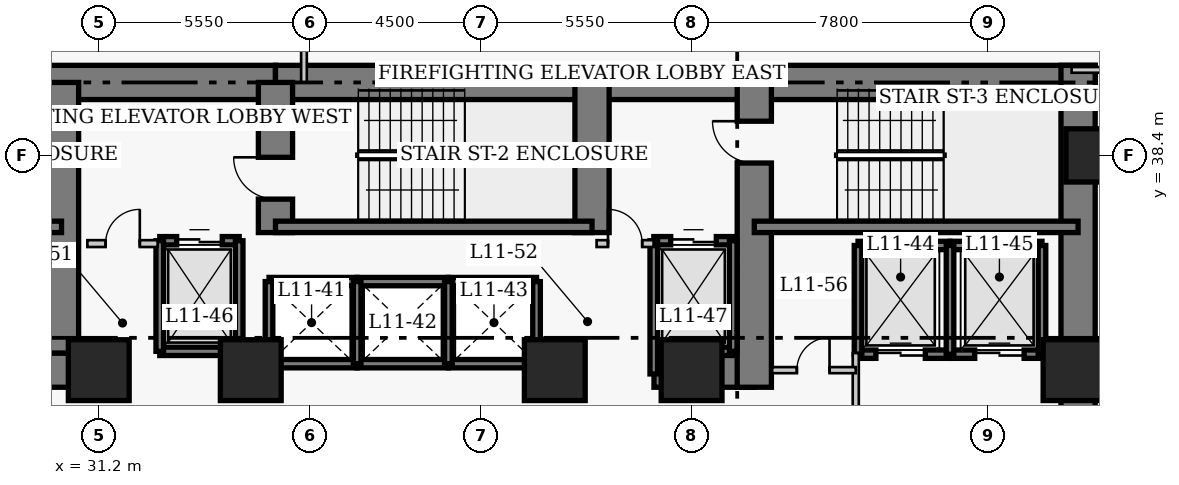
"""IFC4 building model, lengths in metres.
Left out: names, types, materials, properties, quantities, classifications, styles, units other than length and angle.
Written with IfcOpenShell. Run it as: python <this file> out.ifc"""

import sys

from ifc_helpers import new_model, si_unit, direction, frame, frame_2d, origin, origin_2d, place, context, subcontext, project, spatial, rectangle, extrude, element, fill, save


model = new_model("IFC4")
c1 = context("Model", 3, precision=1e-05, world=origin(), true_north=direction((0.0, 1.0)))
c2 = subcontext(c1, "Body", "Model", "MODEL_VIEW")
j1 = project(units=[si_unit("LENGTHUNIT", "METRE"), si_unit("PLANEANGLEUNIT", "RADIAN")], contexts=[c1])
p1 = place(None, origin())
s1 = spatial("IfcSite", under=j1, at=p1, CompositionType="ELEMENT")
p2 = place(p1, origin())
s2 = spatial("IfcBuilding", under=s1, at=p2, CompositionType="ELEMENT")
p3 = place(p2, frame((0.0, 0.0, 48.8)))
s3 = spatial("IfcBuildingStorey", under=s2, at=p3, CompositionType="ELEMENT", Elevation=48.8)
p4 = place(p3, frame((21.45, 40.32, 0.0), z_axis=(0.0, 0.0, 1.0), x_axis=(1.0, 0.0, 0.0)))
e1 = element("IfcWall", 1, at=p4, inside=s3, PredefinedType="SHEAR", context=c2, shape_type="SweptSolid", body=[
    extrude(rectangle(XDim=14.4, YDim=0.9, at=frame_2d((7.2, 0.0))), origin(), (0.0, 0.0, 1.0), 3.8),
])
p5 = place(p3, frame((35.85, 40.32, 0.0), z_axis=(0.0, 0.0, 1.0), x_axis=(1.0, 0.0, 0.0)))
e2 = element("IfcWall", 2, at=p5, inside=s3, PredefinedType="SHEAR", context=c2, shape_type="SweptSolid", body=[
    extrude(rectangle(XDim=12.6, YDim=0.9, at=frame_2d((6.3, 0.0))), origin(), (0.0, 0.0, 1.0), 3.8),
])
p6 = place(p3, frame((48.45, 40.32, 0.0), z_axis=(0.0, 0.0, 1.0), x_axis=(1.0, 0.0, 0.0)))
e3 = element("IfcWall", 3, at=p6, inside=s3, PredefinedType="SHEAR", context=c2, shape_type="SweptSolid", body=[
    extrude(rectangle(XDim=8.97, YDim=0.9, at=frame_2d((4.485, 0.0))), origin(), (0.0, 0.0, 1.0), 3.8),
])
p7 = place(p3, frame((56.97, 27.05, 0.0), z_axis=(0.0, 0.0, 1.0), x_axis=(0.0, 1.0, 0.0)))
e4 = element("IfcWall", 4, at=p7, inside=s3, PredefinedType="SHEAR", context=c2, shape_type="SweptSolid", body=[
    extrude(rectangle(XDim=13.72, YDim=0.9, at=frame_2d((6.86, 0.0))), origin(), (0.0, 0.0, 1.0), 3.8),
])
p8 = place(p3, frame((28.45, 32.75, 0.0), z_axis=(0.0, 0.0, 1.0), x_axis=(1.0, 0.0, 0.0)))
e5 = element("IfcWall", 5, at=p8, inside=s3, PredefinedType="SHEAR", context=c2, shape_type="SweptSolid", body=[
    extrude(rectangle(XDim=2.4, YDim=0.9, at=frame_2d((1.2, 0.0))), origin(), (0.0, 0.0, 1.0), 3.8),
])
p9 = place(p3, frame((45.81, 32.75, 0.0), z_axis=(0.0, 0.0, 1.0), x_axis=(1.0, 0.0, 0.0)))
e6 = element("IfcWall", 6, at=p9, inside=s3, PredefinedType="SHEAR", context=c2, shape_type="SweptSolid", body=[
    extrude(rectangle(XDim=2.64, YDim=0.9, at=frame_2d((1.32, 0.0))), origin(), (0.0, 0.0, 1.0), 3.8),
])
p10 = place(p3, frame((30.22, 33.2, 0.0), z_axis=(0.0, 0.0, 1.0), x_axis=(0.0, 1.0, 0.0)))
e7 = element("IfcWall", 7, at=p10, inside=s3, PredefinedType="SHEAR", context=c2, shape_type="SweptSolid", body=[
    extrude(rectangle(XDim=7.12, YDim=0.9, at=frame_2d((3.56, 0.0))), origin(), (0.0, 0.0, 1.0), 3.8),
])
p11 = place(p3, frame((35.85, 36.37, 0.0), z_axis=(0.0, 0.0, 1.0), x_axis=(0.0, 1.0, 0.0)))
e8 = element("IfcWall", 8, at=p11, inside=s3, PredefinedType="SHEAR", context=c2, shape_type="SweptSolid", body=[
    extrude(rectangle(XDim=3.95, YDim=0.9, at=frame_2d((1.975, 0.0))), origin(), (0.0, 0.0, 1.0), 3.8),
])
p12 = place(p11, frame((0.88, 0.0, 0.0)))
e9 = element("IfcOpeningElement", 9, at=p12, cuts=e8, PredefinedType="OPENING", context=c2, shape_type="SweptSolid", body=[
    extrude(rectangle(XDim=1.1, YDim=2.15, at=frame_2d((0.55, 1.075))), frame((0.0, 0.46, 0.0), z_axis=(0.0, -1.0, 0.0), x_axis=(1.0, 0.0, 0.0)), (0.0, 0.0, 1.0), 0.92),
])
p13 = place(p3, frame((44.18, 36.37, 0.0), z_axis=(0.0, 0.0, 1.0), x_axis=(0.0, 1.0, 0.0)))
e10 = element("IfcWall", 10, at=p13, inside=s3, PredefinedType="SHEAR", context=c2, shape_type="SweptSolid", body=[
    extrude(rectangle(XDim=3.95, YDim=0.9, at=frame_2d((1.975, 0.0))), origin(), (0.0, 0.0, 1.0), 3.8),
])
p14 = place(p3, frame((48.45, 32.3, 0.0), z_axis=(0.0, 0.0, 1.0), x_axis=(0.0, 1.0, 0.0)))
e11 = element("IfcWall", 11, at=p14, inside=s3, PredefinedType="SHEAR", context=c2, shape_type="SweptSolid", body=[
    extrude(rectangle(XDim=8.02, YDim=0.9, at=frame_2d((4.01, 0.0))), origin(), (0.0, 0.0, 1.0), 3.8),
])
p15 = place(p14, frame((5.9, 0.0, 0.0)))
e12 = element("IfcOpeningElement", 12, at=p15, cuts=e11, PredefinedType="OPENING", context=c2, shape_type="SweptSolid", body=[
    extrude(rectangle(XDim=1.1, YDim=2.15, at=frame_2d((0.55, 1.075))), frame((0.0, 0.46, 0.0), z_axis=(0.0, -1.0, 0.0), x_axis=(1.0, 0.0, 0.0)), (0.0, 0.0, 1.0), 0.92),
])
p16 = place(p3, frame((21.9, 36.52, 0.0), z_axis=(0.0, 0.0, 1.0), x_axis=(1.0, 0.0, 0.0)))
e13 = element("IfcWall", 13, at=p16, inside=s3, PredefinedType="SHEAR", context=c2, shape_type="SweptSolid", body=[
    extrude(rectangle(XDim=8.32, YDim=0.3, at=frame_2d((4.16, 0.0))), origin(), (0.0, 0.0, 1.0), 3.8),
])
p17 = place(p16, frame((0.9, 0.0, 0.0)))
e14 = element("IfcOpeningElement", 14, at=p17, cuts=e13, PredefinedType="OPENING", context=c2, shape_type="SweptSolid", body=[
    extrude(rectangle(XDim=1.1, YDim=2.15, at=frame_2d((0.55, 1.075))), frame((0.0, 0.16, 0.0), z_axis=(0.0, -1.0, 0.0), x_axis=(1.0, 0.0, 0.0)), (0.0, 0.0, 1.0), 0.32),
])
p18 = place(p3, frame((35.85, 36.52, 0.0), z_axis=(0.0, 0.0, 1.0), x_axis=(1.0, 0.0, 0.0)))
e15 = element("IfcWall", 15, at=p18, inside=s3, PredefinedType="SHEAR", context=c2, shape_type="SweptSolid", body=[
    extrude(rectangle(XDim=8.33, YDim=0.3, at=frame_2d((4.165, 0.0))), origin(), (0.0, 0.0, 1.0), 3.8),
])
p19 = place(p3, frame((48.45, 36.52, 0.0), z_axis=(0.0, 0.0, 1.0), x_axis=(1.0, 0.0, 0.0)))
e16 = element("IfcWall", 16, at=p19, inside=s3, PredefinedType="SHEAR", context=c2, shape_type="SweptSolid", body=[
    extrude(rectangle(XDim=8.52, YDim=0.3, at=frame_2d((4.26, 0.0))), origin(), (0.0, 0.0, 1.0), 3.8),
])
p20 = place(p3, frame((57.35, 38.4, 0.0), z_axis=(0.0, 0.0, 1.0), x_axis=(1.0, 0.0, 0.0)))
e17 = element("IfcColumn", 17, at=p20, inside=s3, PredefinedType="COLUMN", context=c2, shape_type="SweptSolid", body=[
    extrude(rectangle(XDim=1.4, YDim=1.4, at=origin_2d()), origin(), (0.0, 0.0, 1.0), 3.8),
])
for number, where, z_axis, x_axis in (
    (18, (31.2, 32.75, 0.0), (0.0, 0.0, 1.0), (1.0, 0.0, 0.0)),
    (19, (35.2, 32.75, 0.0), (0.0, 0.0, 1.0), (1.0, 0.0, 0.0)),
    (20, (43.2, 32.75, 0.0), (0.0, 0.0, 1.0), (1.0, 0.0, 0.0)),
    (21, (46.8, 32.75, 0.0), (0.0, 0.0, 1.0), (1.0, 0.0, 0.0)),
    (22, (56.85, 32.75, 0.0), (0.0, 0.0, 1.0), (1.0, 0.0, 0.0)),
):
    element("IfcColumn", number, at=place(p3, frame(where, z_axis=z_axis, x_axis=x_axis)), inside=s3, PredefinedType="COLUMN", context=c2, shape_type="SweptSolid", body=[
        extrude(rectangle(XDim=1.6, YDim=1.6, at=origin_2d()), origin(), (0.0, 0.0, 1.0), 3.8),
    ])
for number, where, z_axis, x_axis in (
    (23, (35.68, 35.08, 0.0), (0.0, 0.0, 1.0), (1.0, 0.0, 0.0)),
    (24, (35.68, 32.92, 0.0), (0.0, 0.0, 1.0), (1.0, 0.0, 0.0)),
):
    element("IfcWall", number, at=place(p3, frame(where, z_axis=z_axis, x_axis=x_axis)), inside=s3, PredefinedType="SHEAR", context=c2, shape_type="SweptSolid", body=[
        extrude(rectangle(XDim=2.32, YDim=0.22, at=frame_2d((1.16, 0.0))), origin(), (0.0, 0.0, 1.0), 3.8),
    ])
p21 = place(p3, frame((35.68, 32.92, 0.0), z_axis=(0.0, 0.0, 1.0), x_axis=(0.0, 1.0, 0.0)))
e25 = element("IfcWall", 25, at=p21, inside=s3, PredefinedType="SHEAR", context=c2, shape_type="SweptSolid", body=[
    extrude(rectangle(XDim=2.16, YDim=0.2, at=frame_2d((1.08, 0.0))), origin(), (0.0, 0.0, 1.0), 3.8),
])
for number, where, z_axis, x_axis in (
    (26, (38.0, 35.08, 0.0), (0.0, 0.0, 1.0), (1.0, 0.0, 0.0)),
    (27, (38.0, 32.92, 0.0), (0.0, 0.0, 1.0), (1.0, 0.0, 0.0)),
):
    element("IfcWall", number, at=place(p3, frame(where, z_axis=z_axis, x_axis=x_axis)), inside=s3, PredefinedType="SHEAR", context=c2, shape_type="SweptSolid", body=[
        extrude(rectangle(XDim=2.4, YDim=0.22, at=frame_2d((1.2, 0.0))), origin(), (0.0, 0.0, 1.0), 3.8),
    ])
p22 = place(p3, frame((38.0, 32.92, 0.0), z_axis=(0.0, 0.0, 1.0), x_axis=(0.0, 1.0, 0.0)))
e28 = element("IfcWall", 28, at=p22, inside=s3, PredefinedType="SHEAR", context=c2, shape_type="SweptSolid", body=[
    extrude(rectangle(XDim=2.16, YDim=0.2, at=frame_2d((1.08, 0.0))), origin(), (0.0, 0.0, 1.0), 3.8),
])
for number, where, z_axis, x_axis in (
    (29, (40.4, 35.08, 0.0), (0.0, 0.0, 1.0), (1.0, 0.0, 0.0)),
    (30, (40.4, 32.92, 0.0), (0.0, 0.0, 1.0), (1.0, 0.0, 0.0)),
):
    element("IfcWall", number, at=place(p3, frame(where, z_axis=z_axis, x_axis=x_axis)), inside=s3, PredefinedType="SHEAR", context=c2, shape_type="SweptSolid", body=[
        extrude(rectangle(XDim=2.32, YDim=0.22, at=frame_2d((1.16, 0.0))), origin(), (0.0, 0.0, 1.0), 3.8),
    ])
for number, where, z_axis, x_axis in (
    (31, (40.4, 32.92, 0.0), (0.0, 0.0, 1.0), (0.0, 1.0, 0.0)),
    (32, (42.72, 32.92, 0.0), (0.0, 0.0, 1.0), (0.0, 1.0, 0.0)),
):
    element("IfcWall", number, at=place(p3, frame(where, z_axis=z_axis, x_axis=x_axis)), inside=s3, PredefinedType="SHEAR", context=c2, shape_type="SweptSolid", body=[
        extrude(rectangle(XDim=2.16, YDim=0.2, at=frame_2d((1.08, 0.0))), origin(), (0.0, 0.0, 1.0), 3.8),
    ])
p23 = place(p3, frame((51.18, 36.03, 0.0), z_axis=(0.0, 0.0, 1.0), x_axis=(1.0, 0.0, 0.0)))
e33 = element("IfcWall", 33, at=p23, inside=s3, PredefinedType="SHEAR", context=c2, shape_type="SweptSolid", body=[
    extrude(rectangle(XDim=2.42, YDim=0.22, at=frame_2d((1.21, 0.0))), origin(), (0.0, 0.0, 1.0), 3.8),
])
p24 = place(p3, frame((51.18, 33.17, 0.0), z_axis=(0.0, 0.0, 1.0), x_axis=(1.0, 0.0, 0.0)))
e34 = element("IfcWall", 34, at=p24, inside=s3, PredefinedType="SHEAR", context=c2, shape_type="SweptSolid", body=[
    extrude(rectangle(XDim=2.42, YDim=0.22, at=frame_2d((1.21, 0.0))), origin(), (0.0, 0.0, 1.0), 3.8),
])
p25 = place(p24, frame((0.47, 0.0, 0.0)))
e35 = element("IfcOpeningElement", 35, at=p25, cuts=e34, PredefinedType="OPENING", context=c2, shape_type="SweptSolid", body=[
    extrude(rectangle(XDim=1.3, YDim=2.15, at=frame_2d((0.65, 1.075))), frame((0.0, 0.12, 0.0), z_axis=(0.0, -1.0, 0.0), x_axis=(1.0, 0.0, 0.0)), (0.0, 0.0, 1.0), 0.24),
])
p26 = place(p3, frame((51.18, 33.17, 0.0), z_axis=(0.0, 0.0, 1.0), x_axis=(0.0, 1.0, 0.0)))
e36 = element("IfcWall", 36, at=p26, inside=s3, PredefinedType="SHEAR", context=c2, shape_type="SweptSolid", body=[
    extrude(rectangle(XDim=2.86, YDim=0.2, at=frame_2d((1.43, 0.0))), origin(), (0.0, 0.0, 1.0), 3.8),
])
p27 = place(p3, frame((53.6, 36.03, 0.0), z_axis=(0.0, 0.0, 1.0), x_axis=(1.0, 0.0, 0.0)))
e37 = element("IfcWall", 37, at=p27, inside=s3, PredefinedType="SHEAR", context=c2, shape_type="SweptSolid", body=[
    extrude(rectangle(XDim=2.42, YDim=0.22, at=frame_2d((1.21, 0.0))), origin(), (0.0, 0.0, 1.0), 3.8),
])
p28 = place(p3, frame((53.6, 33.17, 0.0), z_axis=(0.0, 0.0, 1.0), x_axis=(1.0, 0.0, 0.0)))
e38 = element("IfcWall", 38, at=p28, inside=s3, PredefinedType="SHEAR", context=c2, shape_type="SweptSolid", body=[
    extrude(rectangle(XDim=2.42, YDim=0.22, at=frame_2d((1.21, 0.0))), origin(), (0.0, 0.0, 1.0), 3.8),
])
p29 = place(p28, frame((0.65, 0.0, 0.0)))
e39 = element("IfcOpeningElement", 39, at=p29, cuts=e38, PredefinedType="OPENING", context=c2, shape_type="SweptSolid", body=[
    extrude(rectangle(XDim=1.3, YDim=2.15, at=frame_2d((0.65, 1.075))), frame((0.0, 0.12, 0.0), z_axis=(0.0, -1.0, 0.0), x_axis=(1.0, 0.0, 0.0)), (0.0, 0.0, 1.0), 0.24),
])
for number, where, z_axis, x_axis in (
    (40, (53.6, 33.17, 0.0), (0.0, 0.0, 1.0), (0.0, 1.0, 0.0)),
    (41, (56.02, 33.17, 0.0), (0.0, 0.0, 1.0), (0.0, 1.0, 0.0)),
):
    element("IfcWall", number, at=place(p3, frame(where, z_axis=z_axis, x_axis=x_axis)), inside=s3, PredefinedType="SHEAR", context=c2, shape_type="SweptSolid", body=[
        extrude(rectangle(XDim=2.86, YDim=0.2, at=frame_2d((1.43, 0.0))), origin(), (0.0, 0.0, 1.0), 3.8),
    ])
p30 = place(p3, frame((32.805, 36.155, 0.0), z_axis=(0.0, 0.0, 1.0), x_axis=(1.0, 0.0, 0.0)))
e42 = element("IfcWall", 42, at=p30, inside=s3, PredefinedType="SHEAR", context=c2, shape_type="SweptSolid", body=[
    extrude(rectangle(XDim=2.09, YDim=0.22, at=frame_2d((1.045, 0.0))), origin(), (0.0, 0.0, 1.0), 3.8),
])
p31 = place(p30, frame((0.445, 0.0, 0.0)))
e43 = element("IfcOpeningElement", 43, at=p31, cuts=e42, PredefinedType="OPENING", context=c2, shape_type="SweptSolid", body=[
    extrude(rectangle(XDim=1.2, YDim=2.15, at=frame_2d((0.6, 1.075))), frame((0.0, 0.12, 0.0), z_axis=(0.0, -1.0, 0.0), x_axis=(1.0, 0.0, 0.0)), (0.0, 0.0, 1.0), 0.24),
])
p32 = place(p3, frame((32.805, 33.245, 0.0), z_axis=(0.0, 0.0, 1.0), x_axis=(1.0, 0.0, 0.0)))
e44 = element("IfcWall", 44, at=p32, inside=s3, PredefinedType="SHEAR", context=c2, shape_type="SweptSolid", body=[
    extrude(rectangle(XDim=2.09, YDim=0.22, at=frame_2d((1.045, 0.0))), origin(), (0.0, 0.0, 1.0), 3.8),
])
for number, where, z_axis, x_axis in (
    (45, (32.805, 33.245, 0.0), (0.0, 0.0, 1.0), (0.0, 1.0, 0.0)),
    (46, (34.895, 33.245, 0.0), (0.0, 0.0, 1.0), (0.0, 1.0, 0.0)),
):
    element("IfcWall", number, at=place(p3, frame(where, z_axis=z_axis, x_axis=x_axis)), inside=s3, PredefinedType="SHEAR", context=c2, shape_type="SweptSolid", body=[
        extrude(rectangle(XDim=2.91, YDim=0.2, at=frame_2d((1.455, 0.0))), origin(), (0.0, 0.0, 1.0), 3.8),
    ])
p33 = place(p3, frame((45.805, 36.155, 0.0), z_axis=(0.0, 0.0, 1.0), x_axis=(1.0, 0.0, 0.0)))
e47 = element("IfcWall", 47, at=p33, inside=s3, PredefinedType="SHEAR", context=c2, shape_type="SweptSolid", body=[
    extrude(rectangle(XDim=2.09, YDim=0.22, at=frame_2d((1.045, 0.0))), origin(), (0.0, 0.0, 1.0), 3.8),
])
p34 = place(p33, frame((0.445, 0.0, 0.0)))
e48 = element("IfcOpeningElement", 48, at=p34, cuts=e47, PredefinedType="OPENING", context=c2, shape_type="SweptSolid", body=[
    extrude(rectangle(XDim=1.2, YDim=2.15, at=frame_2d((0.6, 1.075))), frame((0.0, 0.12, 0.0), z_axis=(0.0, -1.0, 0.0), x_axis=(1.0, 0.0, 0.0)), (0.0, 0.0, 1.0), 0.24),
])
p35 = place(p3, frame((45.805, 33.245, 0.0), z_axis=(0.0, 0.0, 1.0), x_axis=(1.0, 0.0, 0.0)))
e49 = element("IfcWall", 49, at=p35, inside=s3, PredefinedType="SHEAR", context=c2, shape_type="SweptSolid", body=[
    extrude(rectangle(XDim=2.09, YDim=0.22, at=frame_2d((1.045, 0.0))), origin(), (0.0, 0.0, 1.0), 3.8),
])
p36 = place(p3, frame((45.805, 32.65, 0.0), z_axis=(0.0, 0.0, 1.0), x_axis=(0.0, 1.0, 0.0)))
e50 = element("IfcWall", 50, at=p36, inside=s3, PredefinedType="SHEAR", context=c2, shape_type="SweptSolid", body=[
    extrude(rectangle(XDim=3.505, YDim=0.2, at=frame_2d((1.752, 0.0))), origin(), (0.0, 0.0, 1.0), 3.8),
])
p37 = place(p3, frame((47.895, 33.245, 0.0), z_axis=(0.0, 0.0, 1.0), x_axis=(0.0, 1.0, 0.0)))
e51 = element("IfcWall", 51, at=p37, inside=s3, PredefinedType="SHEAR", context=c2, shape_type="SweptSolid", body=[
    extrude(rectangle(XDim=2.91, YDim=0.2, at=frame_2d((1.455, 0.0))), origin(), (0.0, 0.0, 1.0), 3.8),
])
p38 = place(p3, frame((30.9, 36.08, 0.0), z_axis=(0.0, 0.0, 1.0), x_axis=(1.0, 0.0, 0.0)))
e52 = element("IfcWall", 52, at=p38, inside=s3, PredefinedType="PARTITIONING", context=c2, shape_type="SweptSolid", body=[
    extrude(rectangle(XDim=1.85, YDim=0.18, at=frame_2d((0.925, 0.0))), origin(), (0.0, 0.0, 1.0), 3.54),
])
p39 = place(p38, frame((0.48, 0.0, 0.0)))
e53 = element("IfcOpeningElement", 53, at=p39, cuts=e52, PredefinedType="OPENING", context=c2, shape_type="SweptSolid", body=[
    extrude(rectangle(XDim=0.9, YDim=2.15, at=frame_2d((0.45, 1.075))), frame((0.0, 0.1, 0.0), z_axis=(0.0, -1.0, 0.0), x_axis=(1.0, 0.0, 0.0)), (0.0, 0.0, 1.0), 0.2),
])
p40 = place(p3, frame((44.3, 36.08, 0.0), z_axis=(0.0, 0.0, 1.0), x_axis=(1.0, 0.0, 0.0)))
e54 = element("IfcWall", 54, at=p40, inside=s3, PredefinedType="PARTITIONING", context=c2, shape_type="SweptSolid", body=[
    extrude(rectangle(XDim=1.5, YDim=0.18, at=frame_2d((0.75, 0.0))), origin(), (0.0, 0.0, 1.0), 3.54),
])
p41 = place(p40, frame((0.3, 0.0, 0.0)))
e55 = element("IfcOpeningElement", 55, at=p41, cuts=e54, PredefinedType="OPENING", context=c2, shape_type="SweptSolid", body=[
    extrude(rectangle(XDim=0.9, YDim=2.15, at=frame_2d((0.45, 1.075))), frame((0.0, 0.1, 0.0), z_axis=(0.0, -1.0, 0.0), x_axis=(1.0, 0.0, 0.0)), (0.0, 0.0, 1.0), 0.2),
])
p42 = place(p3, frame((51.12, 29.5, 0.0), z_axis=(0.0, 0.0, 1.0), x_axis=(0.0, 1.0, 0.0)))
e56 = element("IfcWall", 56, at=p42, inside=s3, PredefinedType="PARTITIONING", context=c2, shape_type="SweptSolid", body=[
    extrude(rectangle(XDim=3.7, YDim=0.16, at=frame_2d((1.85, 0.0))), origin(), (0.0, 0.0, 1.0), 3.54),
])
p43 = place(p42, frame((0.9, 0.0, 0.0)))
e57 = element("IfcOpeningElement", 57, at=p43, cuts=e56, PredefinedType="OPENING", context=c2, shape_type="SweptSolid", body=[
    extrude(rectangle(XDim=1.1, YDim=2.15, at=frame_2d((0.55, 1.075))), frame((0.0, 0.09, 0.0), z_axis=(0.0, -1.0, 0.0), x_axis=(1.0, 0.0, 0.0)), (0.0, 0.0, 1.0), 0.18),
])
p44 = place(p3, frame((48.92, 32.75, 0.0), z_axis=(0.0, 0.0, 1.0), x_axis=(1.0, 0.0, 0.0)))
e58 = element("IfcWall", 58, at=p44, inside=s3, PredefinedType="PARTITIONING", context=c2, shape_type="SweptSolid", body=[
    extrude(rectangle(XDim=2.2, YDim=0.16, at=frame_2d((1.1, 0.0))), origin(), (0.0, 0.0, 1.0), 3.54),
])
p45 = place(p44, frame((0.65, 0.0, 0.0)))
e59 = element("IfcOpeningElement", 59, at=p45, cuts=e58, PredefinedType="OPENING", context=c2, shape_type="SweptSolid", body=[
    extrude(rectangle(XDim=0.86, YDim=2.05, at=frame_2d((0.43, 1.025))), frame((0.0, 0.09, 0.0), z_axis=(0.0, -1.0, 0.0), x_axis=(1.0, 0.0, 0.0)), (0.0, 0.0, 1.0), 0.18),
])
p46 = place(p3, frame((56.8, 40.65, 0.0), z_axis=(0.0, 0.0, 1.0), x_axis=(1.0, 0.0, 0.0)))
e60 = element("IfcWall", 60, at=p46, inside=s3, PredefinedType="PARTITIONING", context=c2, shape_type="SweptSolid", body=[
    extrude(rectangle(XDim=4.36, YDim=0.15, at=frame_2d((2.18, 0.0))), origin(), (0.0, 0.0, 1.0), 3.54),
])
p47 = place(p46, frame((2.75, 0.0, 0.0)))
e61 = element("IfcOpeningElement", 61, at=p47, cuts=e60, PredefinedType="OPENING", context=c2, shape_type="SweptSolid", body=[
    extrude(rectangle(XDim=1.0, YDim=2.15, at=frame_2d((0.5, 1.075))), frame((0.0, 0.085, 0.0), z_axis=(0.0, -1.0, 0.0), x_axis=(1.0, 0.0, 0.0)), (0.0, 0.0, 1.0), 0.17),
])
p48 = place(p3, frame((36.6, 40.32, 0.0), z_axis=(0.0, 0.0, 1.0), x_axis=(0.0, 1.0, 0.0)))
e62 = element("IfcWall", 62, at=p48, inside=s3, PredefinedType="PARTITIONING", context=c2, shape_type="SweptSolid", body=[
    extrude(rectangle(XDim=5.045, YDim=0.15, at=frame_2d((2.522, 0.0))), origin(), (0.0, 0.0, 1.0), 3.54),
])
p49 = place(p25, origin())
e63 = element("IfcDoor", 63, at=p49, inside=s3, OperationType="DOUBLE_DOOR_SLIDING", PredefinedType="DOOR", context=c2, shape_type="SweptSolid", body=[
    extrude(rectangle(XDim=1.3, YDim=2.15, at=frame_2d((0.65, 1.075))), frame((0.0, 0.025, 0.0), z_axis=(0.0, -1.0, 0.0), x_axis=(1.0, 0.0, 0.0)), (0.0, 0.0, 1.0), 0.05),
])
fill(e35, e63)
p50 = place(p29, origin())
e64 = element("IfcDoor", 64, at=p50, inside=s3, OperationType="DOUBLE_DOOR_SLIDING", PredefinedType="DOOR", context=c2, shape_type="SweptSolid", body=[
    extrude(rectangle(XDim=1.3, YDim=2.15, at=frame_2d((0.65, 1.075))), frame((0.0, 0.025, 0.0), z_axis=(0.0, -1.0, 0.0), x_axis=(1.0, 0.0, 0.0)), (0.0, 0.0, 1.0), 0.05),
])
fill(e39, e64)
p51 = place(p31, origin())
e65 = element("IfcDoor", 65, at=p51, inside=s3, OperationType="DOUBLE_DOOR_SLIDING", PredefinedType="DOOR", context=c2, shape_type="SweptSolid", body=[
    extrude(rectangle(XDim=1.2, YDim=2.15, at=frame_2d((0.6, 1.075))), frame((0.0, 0.025, 0.0), z_axis=(0.0, -1.0, 0.0), x_axis=(1.0, 0.0, 0.0)), (0.0, 0.0, 1.0), 0.05),
])
fill(e43, e65)
p52 = place(p34, origin())
e66 = element("IfcDoor", 66, at=p52, inside=s3, OperationType="DOUBLE_DOOR_SLIDING", PredefinedType="DOOR", context=c2, shape_type="SweptSolid", body=[
    extrude(rectangle(XDim=1.2, YDim=2.15, at=frame_2d((0.6, 1.075))), frame((0.0, 0.025, 0.0), z_axis=(0.0, -1.0, 0.0), x_axis=(1.0, 0.0, 0.0)), (0.0, 0.0, 1.0), 0.05),
])
fill(e48, e66)
p53 = place(p39, origin())
e67 = element("IfcDoor", 67, at=p53, inside=s3, OperationType="SINGLE_SWING_RIGHT", PredefinedType="DOOR", context=c2, shape_type="SweptSolid", body=[
    extrude(rectangle(XDim=0.9, YDim=2.15, at=frame_2d((0.45, 1.075))), frame((0.0, 0.025, 0.0), z_axis=(0.0, -1.0, 0.0), x_axis=(1.0, 0.0, 0.0)), (0.0, 0.0, 1.0), 0.05),
])
fill(e53, e67)
p54 = place(p41, origin())
e68 = element("IfcDoor", 68, at=p54, inside=s3, OperationType="SINGLE_SWING_LEFT", PredefinedType="DOOR", context=c2, shape_type="SweptSolid", body=[
    extrude(rectangle(XDim=0.9, YDim=2.15, at=frame_2d((0.45, 1.075))), frame((0.0, 0.025, 0.0), z_axis=(0.0, -1.0, 0.0), x_axis=(1.0, 0.0, 0.0)), (0.0, 0.0, 1.0), 0.05),
])
fill(e55, e68)
p55 = place(p45, origin())
e69 = element("IfcDoor", 69, at=p55, inside=s3, OperationType="SINGLE_SWING_RIGHT", PredefinedType="DOOR", context=c2, shape_type="SweptSolid", body=[
    extrude(rectangle(XDim=0.86, YDim=2.05, at=frame_2d((0.43, 1.025))), frame((0.0, 0.025, 0.0), z_axis=(0.0, -1.0, 0.0), x_axis=(1.0, 0.0, 0.0)), (0.0, 0.0, 1.0), 0.05),
])
fill(e59, e69)
p56 = place(p12, origin())
e70 = element("IfcDoor", 70, at=p56, inside=s3, OperationType="SINGLE_SWING_RIGHT", PredefinedType="DOOR", context=c2, shape_type="SweptSolid", body=[
    extrude(rectangle(XDim=1.1, YDim=2.15, at=frame_2d((0.55, 1.075))), frame((0.0, 0.025, 0.0), z_axis=(0.0, -1.0, 0.0), x_axis=(1.0, 0.0, 0.0)), (0.0, 0.0, 1.0), 0.05),
])
fill(e9, e70)
p57 = place(p15, origin())
e71 = element("IfcDoor", 71, at=p57, inside=s3, OperationType="SINGLE_SWING_RIGHT", PredefinedType="DOOR", context=c2, shape_type="SweptSolid", body=[
    extrude(rectangle(XDim=1.1, YDim=2.15, at=frame_2d((0.55, 1.075))), frame((0.0, 0.025, 0.0), z_axis=(0.0, -1.0, 0.0), x_axis=(1.0, 0.0, 0.0)), (0.0, 0.0, 1.0), 0.05),
])
fill(e12, e71)
save(model, sys.argv[1])
